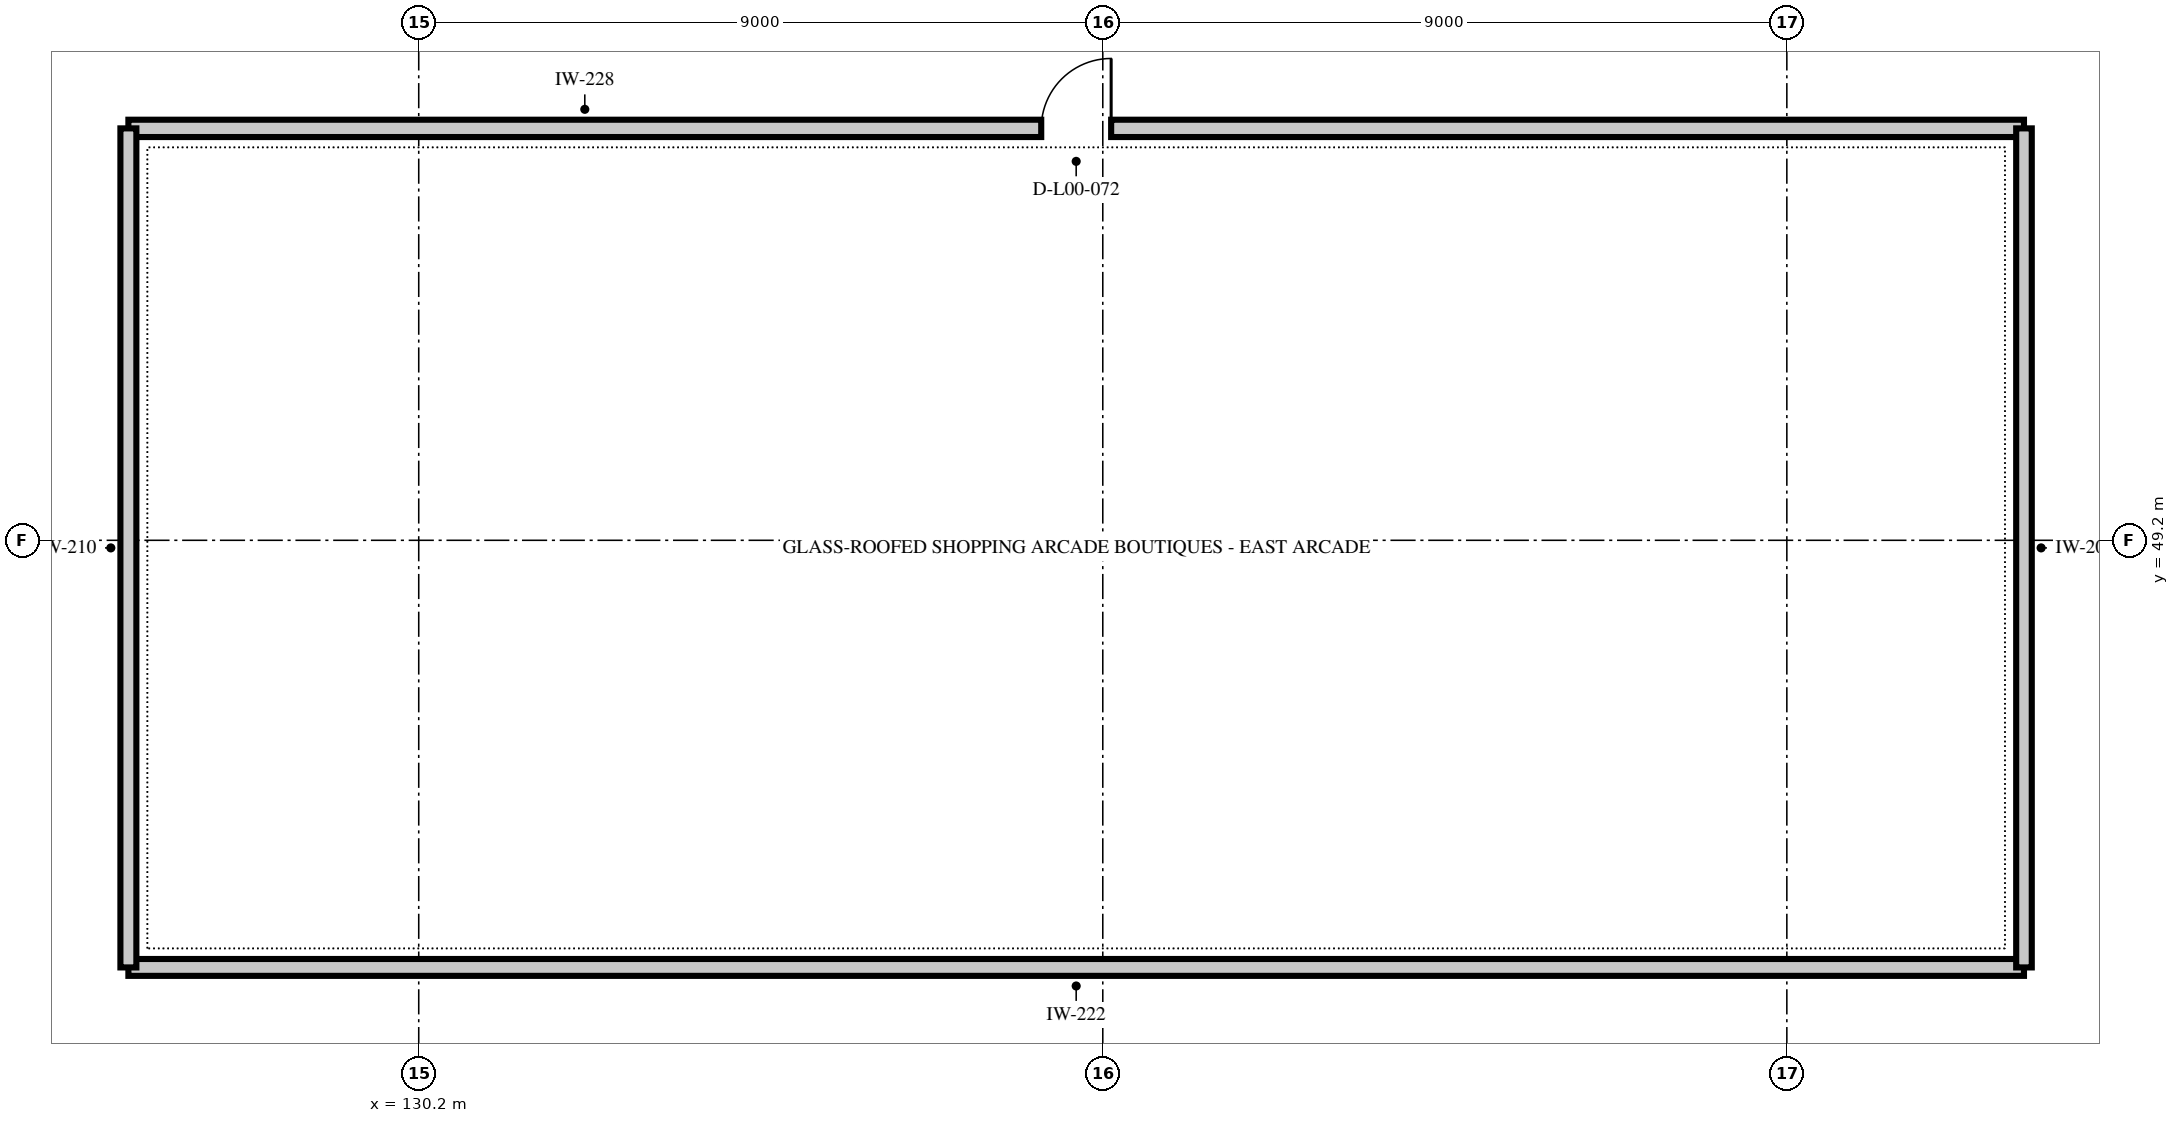
"""IFC4 building model, lengths in metres.
Left out: names, types, materials, properties, quantities, classifications, styles, units other than length and angle.
Written with IfcOpenShell. Run it as: python <this file> out.ifc"""

import sys

from ifc_helpers import new_model, si_unit, direction, frame, frame_2d, origin, place, context, subcontext, project, spatial, rectangle, extrude, element, fill, save


model = new_model("IFC4")
c1 = context("Model", 3, precision=1e-05, world=origin(), true_north=direction((0.0, 1.0)))
c2 = subcontext(c1, "Body", "Model", "MODEL_VIEW")
j1 = project(units=[si_unit("LENGTHUNIT", "METRE"), si_unit("PLANEANGLEUNIT", "RADIAN")], contexts=[c1])
p1 = place(None, origin())
s1 = spatial("IfcSite", under=j1, at=p1, CompositionType="ELEMENT")
p2 = place(p1, origin())
s2 = spatial("IfcBuilding", under=s1, at=p2, CompositionType="ELEMENT")
p3 = place(p2, origin())
s3 = spatial("IfcBuildingStorey", under=s2, at=p3, CompositionType="ELEMENT", Elevation=0.0)
p4 = place(p3, frame((126.38, 54.62, 0.0), z_axis=(0.0, 0.0, 1.0), x_axis=(1.0, 0.0, 0.0)))
e1 = element("IfcWall", 1, at=p4, inside=s3, PredefinedType="PARTITIONING", context=c2, shape_type="SweptSolid", body=[
    extrude(rectangle(XDim=24.94, YDim=0.228, at=frame_2d((12.47, 0.0))), origin(), (0.0, 0.0, 1.0), 5.09),
])
p5 = place(p4, frame((12.01, 0.0, 0.0)))
e2 = element("IfcOpeningElement", 2, at=p5, cuts=e1, PredefinedType="OPENING", context=c2, shape_type="SweptSolid", body=[
    extrude(rectangle(XDim=0.92, YDim=2.1, at=frame_2d((0.46, 1.05))), frame((0.0, 0.126, 0.0), z_axis=(0.0, -1.0, 0.0), x_axis=(1.0, 0.0, 0.0)), (0.0, 0.0, 1.0), 0.252),
])
p6 = place(p3, frame((151.32, 43.58, 0.0), z_axis=(0.0, 0.0, 1.0), x_axis=(-1.0, 0.0, 0.0)))
e3 = element("IfcWall", 3, at=p6, inside=s3, PredefinedType="PARTITIONING", context=c2, shape_type="SweptSolid", body=[
    extrude(rectangle(XDim=24.94, YDim=0.222, at=frame_2d((12.47, 0.0))), origin(), (0.0, 0.0, 1.0), 5.09),
])
p7 = place(p3, frame((126.38, 43.58, 0.0), z_axis=(0.0, 0.0, 1.0), x_axis=(0.0, 1.0, 0.0)))
e4 = element("IfcWall", 4, at=p7, inside=s3, PredefinedType="PARTITIONING", context=c2, shape_type="SweptSolid", body=[
    extrude(rectangle(XDim=11.04, YDim=0.21, at=frame_2d((5.52, 0.0))), origin(), (0.0, 0.0, 1.0), 5.09),
])
p8 = place(p3, frame((151.32, 54.62, 0.0), z_axis=(0.0, 0.0, 1.0), x_axis=(0.0, -1.0, 0.0)))
e5 = element("IfcWall", 5, at=p8, inside=s3, PredefinedType="PARTITIONING", context=c2, shape_type="SweptSolid", body=[
    extrude(rectangle(XDim=11.04, YDim=0.205, at=frame_2d((5.52, 0.0))), origin(), (0.0, 0.0, 1.0), 5.09),
])
p9 = place(p5, origin())
e6 = element("IfcDoor", 6, at=p9, inside=s3, OperationType="SINGLE_SWING_RIGHT", PredefinedType="DOOR", context=c2, shape_type="SweptSolid", body=[
    extrude(rectangle(XDim=0.92, YDim=2.1, at=frame_2d((0.46, 1.05))), frame((0.0, 0.025, 0.0), z_axis=(0.0, -1.0, 0.0), x_axis=(1.0, 0.0, 0.0)), (0.0, 0.0, 1.0), 0.05),
])
fill(e2, e6)
save(model, sys.argv[1])
